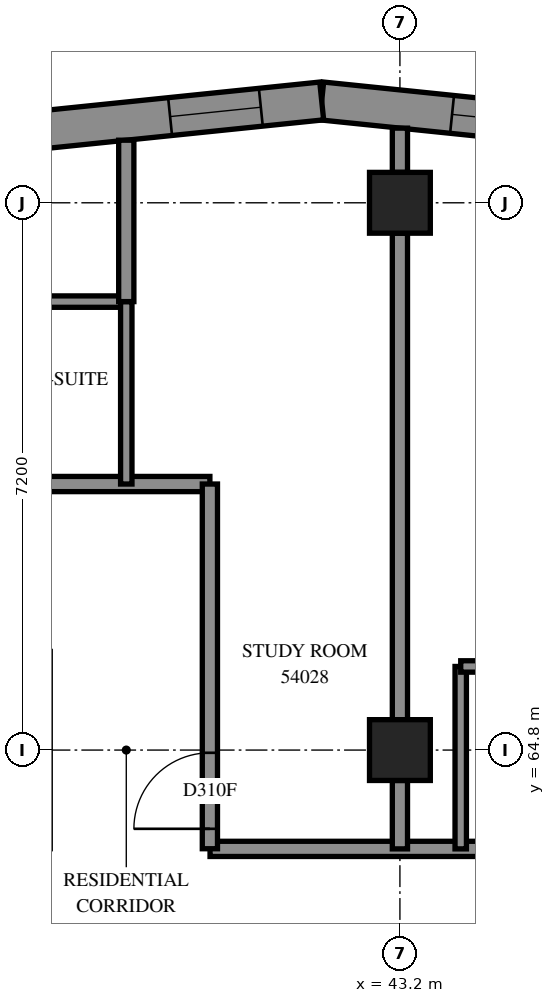
"""IFC4 building model, lengths in metres.
Left out: names, types, materials, properties, quantities, classifications, styles, units other than length and angle.
Written with IfcOpenShell. Run it as: python <this file> out.ifc"""

import sys

from ifc_helpers import new_model, si_unit, direction, frame, frame_2d, origin, origin_2d, place, context, subcontext, project, spatial, polyline, rectangle, outline, extrude, element, fill, save


model = new_model("IFC4")
c1 = context("Model", 3, precision=1e-05, world=origin(), true_north=direction((0.0, 1.0)))
c2 = subcontext(c1, "Body", "Model", "MODEL_VIEW")
j1 = project(units=[si_unit("LENGTHUNIT", "METRE"), si_unit("PLANEANGLEUNIT", "RADIAN")], contexts=[c1])
p1 = place(None, origin())
s1 = spatial("IfcSite", under=j1, at=p1, CompositionType="ELEMENT")
p2 = place(p1, origin())
s2 = spatial("IfcBuilding", under=s1, at=p2, CompositionType="ELEMENT")
p3 = place(p2, frame((0.0, 0.0, 199.8)))
s3 = spatial("IfcBuildingStorey", under=s2, at=p3, CompositionType="ELEMENT", Elevation=199.8)
for number, where, z_axis, x_axis in (
    (1, (43.2, 64.8, 0.0), (0.0, 0.0, 1.0), (1.0, 0.0, 0.0)),
    (2, (43.2, 72.0, 0.0), (0.0, 0.0, 1.0), (1.0, 0.0, 0.0)),
):
    element("IfcColumn", number, at=place(p3, frame(where, z_axis=z_axis, x_axis=x_axis)), inside=s3, PredefinedType="COLUMN", context=c2, shape_type="SweptSolid", body=[
        extrude(rectangle(XDim=0.8, YDim=0.8, at=origin_2d()), origin(), (0.0, 0.0, 1.0), 3.1),
    ])
p4 = place(p3, frame((45.965, 72.949, 0.0), z_axis=(0.0, 0.0, 1.0), x_axis=(-0.9947304076, 0.1025251975, 0.0)))
e3 = element("IfcWall", 3, at=p4, inside=s3, PredefinedType="SOLIDWALL", context=c2, shape_type="SweptSolid", body=[
    extrude(outline(polyline([(0.026, -0.25), (3.84, -0.25), (3.788, 0.25), (-0.026, 0.25), (0.026, -0.25)])), origin(), (0.0, 0.0, 1.0), 3.1),
])
p5 = place(p4, frame((0.89, 0.0, 0.45)))
e4 = element("IfcOpeningElement", 4, at=p5, cuts=e3, PredefinedType="OPENING", context=c2, shape_type="SweptSolid", body=[
    extrude(rectangle(XDim=1.2, YDim=2.5, at=frame_2d((0.6, 1.25))), frame((0.0, 0.26, 0.0), z_axis=(0.0, -1.0, 0.0), x_axis=(1.0, 0.0, 0.0)), (0.0, 0.0, 1.0), 0.52),
])
p6 = place(p3, frame((42.171, 73.34, 0.0), z_axis=(0.0, 0.0, 1.0), x_axis=(-0.9947306832, -0.1025225234, 0.0)))
e5 = element("IfcWall", 5, at=p6, inside=s3, PredefinedType="SOLIDWALL", context=c2, shape_type="SweptSolid", body=[
    extrude(outline(polyline([(-0.026, -0.25), (3.788, -0.25), (3.84, 0.25), (0.026, 0.25), (-0.026, -0.25)])), origin(), (0.0, 0.0, 1.0), 3.1),
])
p7 = place(p6, frame((0.805, 0.0, 0.45)))
e6 = element("IfcOpeningElement", 6, at=p7, cuts=e5, PredefinedType="OPENING", context=c2, shape_type="SweptSolid", body=[
    extrude(rectangle(XDim=1.2, YDim=2.5, at=frame_2d((0.6, 1.25))), frame((0.0, 0.26, 0.0), z_axis=(0.0, -1.0, 0.0), x_axis=(1.0, 0.0, 0.0)), (0.0, 0.0, 1.0), 0.52),
])
p8 = place(p3, frame((21.6, 68.3, 0.0), z_axis=(0.0, 0.0, 1.0), x_axis=(1.0, 0.0, 0.0)))
e7 = element("IfcWall", 7, at=p8, inside=s3, PredefinedType="PARTITIONING", context=c2, shape_type="SweptSolid", body=[
    extrude(rectangle(XDim=19.1, YDim=0.2, at=frame_2d((9.55, 0.0))), origin(), (0.0, 0.0, 1.0), 3.1),
])
p9 = place(p8, frame((2.3, 0.0, 0.0)))
e8 = element("IfcOpeningElement", 8, at=p9, cuts=e7, PredefinedType="OPENING", context=c2, shape_type="SweptSolid", body=[
    extrude(rectangle(XDim=0.9, YDim=2.1, at=frame_2d((0.45, 1.05))), frame((0.0, 0.11, 0.0), z_axis=(0.0, -1.0, 0.0), x_axis=(1.0, 0.0, 0.0)), (0.0, 0.0, 1.0), 0.22),
])
p10 = place(p8, frame((5.901, 0.0, 0.0)))
e9 = element("IfcOpeningElement", 9, at=p10, cuts=e7, PredefinedType="OPENING", context=c2, shape_type="SweptSolid", body=[
    extrude(rectangle(XDim=0.9, YDim=2.1, at=frame_2d((0.45, 1.05))), frame((0.0, 0.11, 0.0), z_axis=(0.0, -1.0, 0.0), x_axis=(1.0, 0.0, 0.0)), (0.0, 0.0, 1.0), 0.22),
])
p11 = place(p8, frame((13.139, 0.0, 0.0)))
e10 = element("IfcOpeningElement", 10, at=p11, cuts=e7, PredefinedType="OPENING", context=c2, shape_type="SweptSolid", body=[
    extrude(rectangle(XDim=0.9, YDim=2.1, at=frame_2d((0.45, 1.05))), frame((0.0, 0.11, 0.0), z_axis=(0.0, -1.0, 0.0), x_axis=(1.0, 0.0, 0.0)), (0.0, 0.0, 1.0), 0.22),
])
p12 = place(p3, frame((40.702, 63.5, 0.0), z_axis=(0.0, 0.0, 1.0), x_axis=(1.0, 0.0, 0.0)))
e11 = element("IfcWall", 11, at=p12, inside=s3, PredefinedType="PARTITIONING", context=c2, shape_type="SweptSolid", body=[
    extrude(rectangle(XDim=14.298, YDim=0.2, at=frame_2d((7.149, 0.0))), origin(), (0.0, 0.0, 1.0), 3.1),
])
p13 = place(p12, frame((6.332, 0.0, 0.0)))
e12 = element("IfcOpeningElement", 12, at=p13, cuts=e11, PredefinedType="OPENING", context=c2, shape_type="SweptSolid", body=[
    extrude(rectangle(XDim=0.9, YDim=2.1, at=frame_2d((0.45, 1.05))), frame((0.0, 0.11, 0.0), z_axis=(0.0, -1.0, 0.0), x_axis=(1.0, 0.0, 0.0)), (0.0, 0.0, 1.0), 0.22),
])
p14 = place(p12, frame((10.098, 0.0, 0.0)))
e13 = element("IfcOpeningElement", 13, at=p14, cuts=e11, PredefinedType="OPENING", context=c2, shape_type="SweptSolid", body=[
    extrude(rectangle(XDim=0.9, YDim=2.1, at=frame_2d((0.45, 1.05))), frame((0.0, 0.11, 0.0), z_axis=(0.0, -1.0, 0.0), x_axis=(1.0, 0.0, 0.0)), (0.0, 0.0, 1.0), 0.22),
])
p15 = place(p3, frame((43.2, 65.2, 0.0), z_axis=(0.0, 0.0, 1.0), x_axis=(0.0, 1.0, 0.0)))
e14 = element("IfcWall", 14, at=p15, inside=s3, PredefinedType="PARTITIONING", context=c2, shape_type="SweptSolid", body=[
    extrude(rectangle(XDim=6.4, YDim=0.2, at=frame_2d((3.2, 0.0))), origin(), (0.0, 0.0, 1.0), 3.1),
])
p16 = place(p3, frame((40.7, 63.502, 0.0), z_axis=(0.0, 0.0, 1.0), x_axis=(0.0, 1.0, 0.0)))
e15 = element("IfcWall", 15, at=p16, inside=s3, PredefinedType="PARTITIONING", context=c2, shape_type="SweptSolid", body=[
    extrude(rectangle(XDim=4.798, YDim=0.2, at=frame_2d((2.399, 0.0))), origin(), (0.0, 0.0, 1.0), 3.1),
])
p17 = place(p16, frame((0.262, 0.0, 0.0)))
e16 = element("IfcOpeningElement", 16, at=p17, cuts=e15, PredefinedType="OPENING", context=c2, shape_type="SweptSolid", body=[
    extrude(rectangle(XDim=1.0, YDim=2.1, at=frame_2d((0.5, 1.05))), frame((0.0, 0.11, 0.0), z_axis=(0.0, -1.0, 0.0), x_axis=(1.0, 0.0, 0.0)), (0.0, 0.0, 1.0), 0.22),
])
p18 = place(p3, frame((36.4, 70.7, 0.0), z_axis=(0.0, 0.0, 1.0), x_axis=(1.0, 0.0, 0.0)))
e17 = element("IfcWall", 17, at=p18, inside=s3, PredefinedType="PARTITIONING", context=c2, shape_type="SweptSolid", body=[
    extrude(rectangle(XDim=3.2, YDim=0.15, at=frame_2d((1.6, 0.0))), origin(), (0.0, 0.0, 1.0), 3.1),
])
p19 = place(p18, frame((1.204, 0.0, 0.0)))
e18 = element("IfcOpeningElement", 18, at=p19, cuts=e17, PredefinedType="OPENING", context=c2, shape_type="SweptSolid", body=[
    extrude(rectangle(XDim=0.8, YDim=2.1, at=frame_2d((0.4, 1.05))), frame((0.0, 0.085, 0.0), z_axis=(0.0, -1.0, 0.0), x_axis=(1.0, 0.0, 0.0)), (0.0, 0.0, 1.0), 0.17),
])
for number, where, z_axis, x_axis in (
    (19, (39.6, 68.3, 0.0), (0.0, 0.0, 1.0), (0.0, 1.0, 0.0)),
    (20, (44.0, 63.5, 0.0), (0.0, 0.0, 1.0), (0.0, 1.0, 0.0)),
):
    element("IfcWall", number, at=place(p3, frame(where, z_axis=z_axis, x_axis=x_axis)), inside=s3, PredefinedType="PARTITIONING", context=c2, shape_type="SweptSolid", body=[
        extrude(rectangle(XDim=2.4, YDim=0.15, at=frame_2d((1.2, 0.0))), origin(), (0.0, 0.0, 1.0), 3.1),
    ])
p20 = place(p3, frame((39.6, 70.7, 0.0), z_axis=(0.0, 0.0, 1.0), x_axis=(0.0, 1.0, 0.0)))
e21 = element("IfcWall", 21, at=p20, inside=s3, PredefinedType="PARTITIONING", context=c2, shape_type="SweptSolid", body=[
    extrude(rectangle(XDim=2.123, YDim=0.2, at=frame_2d((1.062, 0.0))), origin(), (0.0, 0.0, 1.0), 3.1),
])
p21 = place(p3, frame((44.0, 65.9, 0.0), z_axis=(0.0, 0.0, 1.0), x_axis=(1.0, 0.0, 0.0)))
e22 = element("IfcWall", 22, at=p21, inside=s3, PredefinedType="PARTITIONING", context=c2, shape_type="SweptSolid", body=[
    extrude(rectangle(XDim=1.9, YDim=0.15, at=frame_2d((0.95, 0.0))), origin(), (0.0, 0.0, 1.0), 3.1),
])
p22 = place(p21, frame((0.505, 0.0, 0.0)))
e23 = element("IfcOpeningElement", 23, at=p22, cuts=e22, PredefinedType="OPENING", context=c2, shape_type="SweptSolid", body=[
    extrude(rectangle(XDim=0.8, YDim=2.1, at=frame_2d((0.4, 1.05))), frame((0.0, 0.085, 0.0), z_axis=(0.0, -1.0, 0.0), x_axis=(1.0, 0.0, 0.0)), (0.0, 0.0, 1.0), 0.17),
])
p23 = place(p3, frame((43.2, 63.5, 0.0), z_axis=(0.0, 0.0, 1.0), x_axis=(0.0, 1.0, 0.0)))
e24 = element("IfcWall", 24, at=p23, inside=s3, PredefinedType="PARTITIONING", context=c2, shape_type="SweptSolid", body=[
    extrude(rectangle(XDim=0.9, YDim=0.2, at=frame_2d((0.45, 0.0))), origin(), (0.0, 0.0, 1.0), 3.1),
])
p24 = place(p3, frame((43.2, 72.4, 0.0), z_axis=(0.0, 0.0, 1.0), x_axis=(0.0, 1.0, 0.0)))
e25 = element("IfcWall", 25, at=p24, inside=s3, PredefinedType="PARTITIONING", context=c2, shape_type="SweptSolid", body=[
    extrude(rectangle(XDim=0.582, YDim=0.2, at=frame_2d((0.291, 0.0))), origin(), (0.0, 0.0, 1.0), 3.1),
])
p25 = place(p5, origin())
e26 = element("IfcWindow", 26, at=p25, inside=s3, PartitioningType="SINGLE_PANEL", PredefinedType="WINDOW", context=c2, shape_type="SweptSolid", body=[
    extrude(rectangle(XDim=1.2, YDim=2.5, at=frame_2d((0.6, 1.25))), frame((0.0, 0.18, 0.0), z_axis=(0.0, -1.0, 0.0), x_axis=(1.0, 0.0, 0.0)), (0.0, 0.0, 1.0), 0.06),
])
fill(e4, e26)
p26 = place(p7, origin())
e27 = element("IfcWindow", 27, at=p26, inside=s3, PartitioningType="SINGLE_PANEL", PredefinedType="WINDOW", context=c2, shape_type="SweptSolid", body=[
    extrude(rectangle(XDim=1.2, YDim=2.5, at=frame_2d((0.6, 1.25))), frame((0.0, 0.18, 0.0), z_axis=(0.0, -1.0, 0.0), x_axis=(1.0, 0.0, 0.0)), (0.0, 0.0, 1.0), 0.06),
])
fill(e6, e27)
p27 = place(p17, origin())
e28 = element("IfcDoor", 28, at=p27, inside=s3, OperationType="SINGLE_SWING_LEFT", PredefinedType="DOOR", context=c2, shape_type="SweptSolid", body=[
    extrude(rectangle(XDim=1.0, YDim=2.1, at=frame_2d((0.5, 1.05))), frame((0.0, 0.025, 0.0), z_axis=(0.0, -1.0, 0.0), x_axis=(1.0, 0.0, 0.0)), (0.0, 0.0, 1.0), 0.05),
])
fill(e16, e28)
save(model, sys.argv[1])
